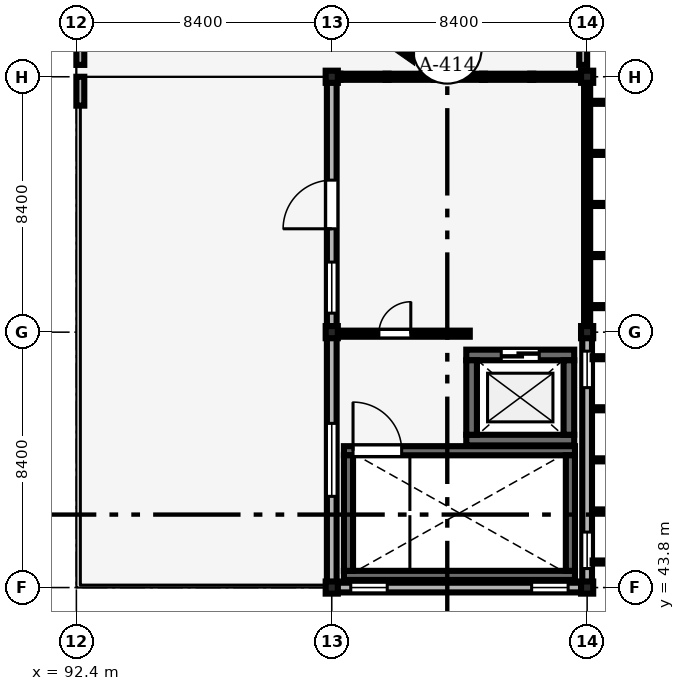
"""IFC4 building model, lengths in metres.
Left out: names, types, materials, properties, quantities, classifications, styles, units other than length and angle.
Written with IfcOpenShell. Run it as: python <this file> out.ifc"""

import sys

from ifc_helpers import new_model, si_unit, direction, frame, frame_2d, origin, origin_2d, place, context, subcontext, project, spatial, rectangle, extrude, element, fill, save


model = new_model("IFC4")
c1 = context("Model", 3, precision=1e-05, world=origin(), true_north=direction((0.0, 1.0)))
c2 = subcontext(c1, "Body", "Model", "MODEL_VIEW")
j1 = project(units=[si_unit("LENGTHUNIT", "METRE"), si_unit("PLANEANGLEUNIT", "RADIAN")], contexts=[c1])
p1 = place(None, origin())
s1 = spatial("IfcSite", under=j1, at=p1, CompositionType="ELEMENT")
p2 = place(p1, origin())
s2 = spatial("IfcBuilding", under=s1, at=p2, CompositionType="ELEMENT")
p3 = place(p2, frame((0.0, 0.0, 21.6)))
s3 = spatial("IfcBuildingStorey", under=s2, at=p3, CompositionType="ELEMENT", Elevation=21.6)
for number, where, z_axis, x_axis in (
    (1, (100.8, 43.8, 0.0), (0.0, 0.0, 1.0), (1.0, 0.0, 0.0)),
    (2, (100.8, 52.2, 0.0), (0.0, 0.0, 1.0), (1.0, 0.0, 0.0)),
    (3, (100.8, 60.6, 0.0), (0.0, 0.0, 1.0), (1.0, 0.0, 0.0)),
    (4, (109.2, 43.8, 0.0), (0.0, 0.0, 1.0), (1.0, 0.0, 0.0)),
    (5, (109.2, 52.2, 0.0), (0.0, 0.0, 1.0), (1.0, 0.0, 0.0)),
    (6, (109.2, 60.6, 0.0), (0.0, 0.0, 1.0), (1.0, 0.0, 0.0)),
):
    element("IfcColumn", number, at=place(p3, frame(where, z_axis=z_axis, x_axis=x_axis)), inside=s3, PredefinedType="COLUMN", context=c2, shape_type="SweptSolid", body=[
        extrude(rectangle(XDim=0.4, YDim=0.4, at=origin_2d()), origin(), (0.0, 0.0, 1.0), 4.2),
    ])
p4 = place(p3, frame((100.975, 43.8, 0.0), z_axis=(0.0, 0.0, 1.0), x_axis=(1.0, 0.0, 0.0)))
e7 = element("IfcWall", 7, at=p4, inside=s3, PredefinedType="SOLIDWALL", context=c2, shape_type="SweptSolid", body=[
    extrude(rectangle(XDim=8.05, YDim=0.32, at=frame_2d((4.025, 0.0))), origin(), (0.0, 0.0, 1.0), 3.48),
])
p5 = place(p4, frame((0.45, 0.0, 0.9)))
e8 = element("IfcOpeningElement", 8, at=p5, cuts=e7, PredefinedType="OPENING", context=c2, shape_type="SweptSolid", body=[
    extrude(rectangle(XDim=1.2, YDim=1.5, at=frame_2d((0.6, 0.75))), frame((0.0, 0.17, 0.0), z_axis=(0.0, -1.0, 0.0), x_axis=(1.0, 0.0, 0.0)), (0.0, 0.0, 1.0), 0.34),
])
p6 = place(p4, frame((6.4, 0.0, 0.9)))
e9 = element("IfcOpeningElement", 9, at=p6, cuts=e7, PredefinedType="OPENING", context=c2, shape_type="SweptSolid", body=[
    extrude(rectangle(XDim=1.2, YDim=1.8, at=frame_2d((0.6, 0.9))), frame((0.0, 0.17, 0.0), z_axis=(0.0, -1.0, 0.0), x_axis=(1.0, 0.0, 0.0)), (0.0, 0.0, 1.0), 0.34),
])
p7 = place(p3, frame((109.2, 43.975, 0.0), z_axis=(0.0, 0.0, 1.0), x_axis=(0.0, 1.0, 0.0)))
e10 = element("IfcWall", 10, at=p7, inside=s3, PredefinedType="SOLIDWALL", context=c2, shape_type="SweptSolid", body=[
    extrude(rectangle(XDim=8.05, YDim=0.32, at=frame_2d((4.025, 0.0))), origin(), (0.0, 0.0, 1.0), 3.43),
])
p8 = place(p7, frame((0.45, 0.0, 0.85)))
e11 = element("IfcOpeningElement", 11, at=p8, cuts=e10, PredefinedType="OPENING", context=c2, shape_type="SweptSolid", body=[
    extrude(rectangle(XDim=1.2, YDim=1.8, at=frame_2d((0.6, 0.9))), frame((0.0, 0.17, 0.0), z_axis=(0.0, -1.0, 0.0), x_axis=(1.0, 0.0, 0.0)), (0.0, 0.0, 1.0), 0.34),
])
p9 = place(p7, frame((6.4, 0.0, 0.85)))
e12 = element("IfcOpeningElement", 12, at=p9, cuts=e10, PredefinedType="OPENING", context=c2, shape_type="SweptSolid", body=[
    extrude(rectangle(XDim=1.2, YDim=1.8, at=frame_2d((0.6, 0.9))), frame((0.0, 0.17, 0.0), z_axis=(0.0, -1.0, 0.0), x_axis=(1.0, 0.0, 0.0)), (0.0, 0.0, 1.0), 0.34),
])
p10 = place(p3, frame((100.8, 43.975, 0.0), z_axis=(0.0, 0.0, 1.0), x_axis=(0.0, 1.0, 0.0)))
e13 = element("IfcWall", 13, at=p10, inside=s3, PredefinedType="SOLIDWALL", context=c2, shape_type="SweptSolid", body=[
    extrude(rectangle(XDim=8.05, YDim=0.32, at=frame_2d((4.025, 0.0))), origin(), (0.0, 0.0, 1.0), 3.43),
])
p11 = place(p10, frame((2.825, 0.0, 0.9)))
e14 = element("IfcOpeningElement", 14, at=p11, cuts=e13, PredefinedType="OPENING", context=c2, shape_type="SweptSolid", body=[
    extrude(rectangle(XDim=2.4, YDim=1.8, at=frame_2d((1.2, 0.9))), frame((0.0, 0.17, 0.0), z_axis=(0.0, -1.0, 0.0), x_axis=(1.0, 0.0, 0.0)), (0.0, 0.0, 1.0), 0.34),
])
p12 = place(p3, frame((100.8, 52.375, 0.0), z_axis=(0.0, 0.0, 1.0), x_axis=(0.0, 1.0, 0.0)))
e15 = element("IfcWall", 15, at=p12, inside=s3, PredefinedType="SOLIDWALL", context=c2, shape_type="SweptSolid", body=[
    extrude(rectangle(XDim=8.05, YDim=0.32, at=frame_2d((4.025, 0.0))), origin(), (0.0, 0.0, 1.0), 3.48),
])
p13 = place(p12, frame((3.225, 0.0, 0.0)))
e16 = element("IfcOpeningElement", 16, at=p13, cuts=e15, PredefinedType="OPENING", context=c2, shape_type="SweptSolid", body=[
    extrude(rectangle(XDim=1.6, YDim=2.3, at=frame_2d((0.8, 1.15))), frame((0.0, 0.17, 0.0), z_axis=(0.0, -1.0, 0.0), x_axis=(1.0, 0.0, 0.0)), (0.0, 0.0, 1.0), 0.34),
])
p14 = place(p12, frame((0.45, 0.0, 0.95)))
e17 = element("IfcOpeningElement", 17, at=p14, cuts=e15, PredefinedType="OPENING", context=c2, shape_type="SweptSolid", body=[
    extrude(rectangle(XDim=1.68, YDim=2.1, at=frame_2d((0.84, 1.05))), frame((0.0, 0.17, 0.0), z_axis=(0.0, -1.0, 0.0), x_axis=(1.0, 0.0, 0.0)), (0.0, 0.0, 1.0), 0.34),
])
for number, where, z_axis, x_axis in (
    (18, (92.53, 60.99, 0.0), (0.0, 0.0, 1.0), (0.0, 1.0, 0.0)),
    (19, (109.07, 60.99, 0.0), (0.0, 0.0, 1.0), (0.0, 1.0, 0.0)),
):
    element("IfcWall", number, at=place(p3, frame(where, z_axis=z_axis, x_axis=x_axis)), inside=s3, PredefinedType="PARAPET", context=c2, shape_type="SweptSolid", body=[
        extrude(rectangle(XDim=24.42, YDim=0.26, at=frame_2d((12.21, 0.0))), origin(), (0.0, 0.0, 1.0), 0.85),
    ])
p15 = place(p3, frame((92.53, 59.65, 0.0), z_axis=(0.0, 0.0, 1.0), x_axis=(0.0, 1.0, 0.0)))
e20 = element("IfcWall", 20, at=p15, inside=s3, PredefinedType="PARAPET", context=c2, shape_type="SweptSolid", body=[
    extrude(rectangle(XDim=0.95, YDim=0.26, at=frame_2d((0.475, 0.0))), origin(), (0.0, 0.0, 1.0), 1.12),
])
p16 = place(p3, frame((101.2, 44.2, 0.0), z_axis=(0.0, 0.0, 1.0), x_axis=(1.0, 0.0, 0.0)))
e21 = element("IfcWall", 21, at=p16, inside=s3, PredefinedType="SHEAR", context=c2, shape_type="SweptSolid", body=[
    extrude(rectangle(XDim=7.6, YDim=0.3, at=frame_2d((3.8, 0.0))), origin(), (0.0, 0.0, 1.0), 4.025),
])
p17 = place(p3, frame((101.2, 48.3, 0.0), z_axis=(0.0, 0.0, 1.0), x_axis=(1.0, 0.0, 0.0)))
e22 = element("IfcWall", 22, at=p17, inside=s3, PredefinedType="SHEAR", context=c2, shape_type="SweptSolid", body=[
    extrude(rectangle(XDim=7.6, YDim=0.3, at=frame_2d((3.8, 0.0))), origin(), (0.0, 0.0, 1.0), 4.025),
])
p18 = place(p17, frame((0.3, 0.0, 0.0)))
e23 = element("IfcOpeningElement", 23, at=p18, cuts=e22, PredefinedType="OPENING", context=c2, shape_type="SweptSolid", body=[
    extrude(rectangle(XDim=1.6, YDim=2.2, at=frame_2d((0.8, 1.1))), frame((0.0, 0.16, 0.0), z_axis=(0.0, -1.0, 0.0), x_axis=(1.0, 0.0, 0.0)), (0.0, 0.0, 1.0), 0.32),
])
for number, where, z_axis, x_axis in (
    (24, (101.35, 44.35, 0.0), (0.0, 0.0, 1.0), (0.0, 1.0, 0.0)),
    (25, (108.65, 44.35, 0.0), (0.0, 0.0, 1.0), (0.0, 1.0, 0.0)),
):
    element("IfcWall", number, at=place(p3, frame(where, z_axis=z_axis, x_axis=x_axis)), inside=s3, PredefinedType="SHEAR", context=c2, shape_type="SweptSolid", body=[
        extrude(rectangle(XDim=3.8, YDim=0.3, at=frame_2d((1.9, 0.0))), origin(), (0.0, 0.0, 1.0), 4.025),
    ])
p19 = place(p3, frame((105.225, 48.65, 0.0), z_axis=(0.0, 0.0, 1.0), x_axis=(1.0, 0.0, 0.0)))
e26 = element("IfcWall", 26, at=p19, inside=s3, PredefinedType="SHEAR", context=c2, shape_type="SweptSolid", body=[
    extrude(rectangle(XDim=3.55, YDim=0.35, at=frame_2d((1.775, 0.0))), origin(), (0.0, 0.0, 1.0), 3.92),
])
p20 = place(p3, frame((105.225, 51.45, 0.0), z_axis=(0.0, 0.0, 1.0), x_axis=(1.0, 0.0, 0.0)))
e27 = element("IfcWall", 27, at=p20, inside=s3, PredefinedType="SHEAR", context=c2, shape_type="SweptSolid", body=[
    extrude(rectangle(XDim=3.55, YDim=0.35, at=frame_2d((1.775, 0.0))), origin(), (0.0, 0.0, 1.0), 3.92),
])
p21 = place(p20, frame((1.15, 0.0, 0.0)))
e28 = element("IfcOpeningElement", 28, at=p21, cuts=e27, PredefinedType="OPENING", context=c2, shape_type="SweptSolid", body=[
    extrude(rectangle(XDim=1.25, YDim=2.25, at=frame_2d((0.625, 1.125))), frame((0.0, 0.185, 0.0), z_axis=(0.0, -1.0, 0.0), x_axis=(1.0, 0.0, 0.0)), (0.0, 0.0, 1.0), 0.37),
])
for number, where, z_axis, x_axis in (
    (29, (105.4, 48.825, 0.0), (0.0, 0.0, 1.0), (0.0, 1.0, 0.0)),
    (30, (108.6, 48.825, 0.0), (0.0, 0.0, 1.0), (0.0, 1.0, 0.0)),
):
    element("IfcWall", number, at=place(p3, frame(where, z_axis=z_axis, x_axis=x_axis)), inside=s3, PredefinedType="SHEAR", context=c2, shape_type="SweptSolid", body=[
        extrude(rectangle(XDim=2.45, YDim=0.35, at=frame_2d((1.225, 0.0))), origin(), (0.0, 0.0, 1.0), 3.92),
    ])
p22 = place(p3, frame((100.965, 52.15, 0.0), z_axis=(0.0, 0.0, 1.0), x_axis=(1.0, 0.0, 0.0)))
e31 = element("IfcWall", 31, at=p22, inside=s3, PredefinedType="PARTITIONING", context=c2, shape_type="SweptSolid", body=[
    extrude(rectangle(XDim=4.375, YDim=0.2, at=frame_2d((2.188, 0.0))), origin(), (0.0, 0.0, 1.0), 3.43),
])
p23 = place(p22, frame((1.385, 0.0, 0.0)))
e32 = element("IfcOpeningElement", 32, at=p23, cuts=e31, PredefinedType="OPENING", context=c2, shape_type="SweptSolid", body=[
    extrude(rectangle(XDim=1.05, YDim=2.2, at=frame_2d((0.525, 1.1))), frame((0.0, 0.11, 0.0), z_axis=(0.0, -1.0, 0.0), x_axis=(1.0, 0.0, 0.0)), (0.0, 0.0, 1.0), 0.22),
])
p24 = place(p5, origin())
e33 = element("IfcWindow", 33, at=p24, inside=s3, PartitioningType="SINGLE_PANEL", PredefinedType="WINDOW", context=c2, shape_type="SweptSolid", body=[
    extrude(rectangle(XDim=1.2, YDim=1.5, at=frame_2d((0.6, 0.75))), frame((0.0, 0.03, 0.0), z_axis=(0.0, -1.0, 0.0), x_axis=(1.0, 0.0, 0.0)), (0.0, 0.0, 1.0), 0.06),
])
fill(e8, e33)
p25 = place(p6, origin())
e34 = element("IfcWindow", 34, at=p25, inside=s3, PartitioningType="SINGLE_PANEL", PredefinedType="WINDOW", context=c2, shape_type="SweptSolid", body=[
    extrude(rectangle(XDim=1.2, YDim=1.8, at=frame_2d((0.6, 0.9))), frame((0.0, 0.03, 0.0), z_axis=(0.0, -1.0, 0.0), x_axis=(1.0, 0.0, 0.0)), (0.0, 0.0, 1.0), 0.06),
])
fill(e9, e34)
p26 = place(p8, origin())
e35 = element("IfcWindow", 35, at=p26, inside=s3, PartitioningType="SINGLE_PANEL", PredefinedType="WINDOW", context=c2, shape_type="SweptSolid", body=[
    extrude(rectangle(XDim=1.2, YDim=1.8, at=frame_2d((0.6, 0.9))), frame((0.0, 0.03, 0.0), z_axis=(0.0, -1.0, 0.0), x_axis=(1.0, 0.0, 0.0)), (0.0, 0.0, 1.0), 0.06),
])
fill(e11, e35)
p27 = place(p9, origin())
e36 = element("IfcWindow", 36, at=p27, inside=s3, PartitioningType="SINGLE_PANEL", PredefinedType="WINDOW", context=c2, shape_type="SweptSolid", body=[
    extrude(rectangle(XDim=1.2, YDim=1.8, at=frame_2d((0.6, 0.9))), frame((0.0, 0.03, 0.0), z_axis=(0.0, -1.0, 0.0), x_axis=(1.0, 0.0, 0.0)), (0.0, 0.0, 1.0), 0.06),
])
fill(e12, e36)
p28 = place(p11, origin())
e37 = element("IfcWindow", 37, at=p28, inside=s3, PartitioningType="SINGLE_PANEL", PredefinedType="WINDOW", context=c2, shape_type="SweptSolid", body=[
    extrude(rectangle(XDim=2.4, YDim=1.8, at=frame_2d((1.2, 0.9))), frame((0.0, 0.03, 0.0), z_axis=(0.0, -1.0, 0.0), x_axis=(1.0, 0.0, 0.0)), (0.0, 0.0, 1.0), 0.06),
])
fill(e14, e37)
p29 = place(p13, origin())
e38 = element("IfcDoor", 38, at=p29, inside=s3, OperationType="DOUBLE_DOOR_SINGLE_SWING", PredefinedType="DOOR", context=c2, shape_type="SweptSolid", body=[
    extrude(rectangle(XDim=1.6, YDim=2.3, at=frame_2d((0.8, 1.15))), frame((0.0, 0.025, 0.0), z_axis=(0.0, -1.0, 0.0), x_axis=(1.0, 0.0, 0.0)), (0.0, 0.0, 1.0), 0.05),
])
fill(e16, e38)
p30 = place(p14, origin())
e39 = element("IfcWindow", 39, at=p30, inside=s3, PartitioningType="SINGLE_PANEL", PredefinedType="WINDOW", context=c2, shape_type="SweptSolid", body=[
    extrude(rectangle(XDim=1.68, YDim=2.1, at=frame_2d((0.84, 1.05))), frame((0.0, 0.03, 0.0), z_axis=(0.0, -1.0, 0.0), x_axis=(1.0, 0.0, 0.0)), (0.0, 0.0, 1.0), 0.06),
])
fill(e17, e39)
p31 = place(p18, origin())
e40 = element("IfcDoor", 40, at=p31, inside=s3, OperationType="DOUBLE_DOOR_SINGLE_SWING", PredefinedType="DOOR", context=c2, shape_type="SweptSolid", body=[
    extrude(rectangle(XDim=1.6, YDim=2.2, at=frame_2d((0.8, 1.1))), frame((0.0, 0.025, 0.0), z_axis=(0.0, -1.0, 0.0), x_axis=(1.0, 0.0, 0.0)), (0.0, 0.0, 1.0), 0.05),
])
fill(e23, e40)
p32 = place(p21, origin())
e41 = element("IfcDoor", 41, at=p32, inside=s3, OperationType="DOUBLE_DOOR_SLIDING", PredefinedType="DOOR", context=c2, shape_type="SweptSolid", body=[
    extrude(rectangle(XDim=1.25, YDim=2.25, at=frame_2d((0.625, 1.125))), frame((0.0, 0.025, 0.0), z_axis=(0.0, -1.0, 0.0), x_axis=(1.0, 0.0, 0.0)), (0.0, 0.0, 1.0), 0.05),
])
fill(e28, e41)
p33 = place(p23, origin())
e42 = element("IfcDoor", 42, at=p33, inside=s3, OperationType="SINGLE_SWING_RIGHT", PredefinedType="DOOR", context=c2, shape_type="SweptSolid", body=[
    extrude(rectangle(XDim=1.05, YDim=2.2, at=frame_2d((0.525, 1.1))), frame((0.0, 0.025, 0.0), z_axis=(0.0, -1.0, 0.0), x_axis=(1.0, 0.0, 0.0)), (0.0, 0.0, 1.0), 0.05),
])
fill(e32, e42)
save(model, sys.argv[1])
